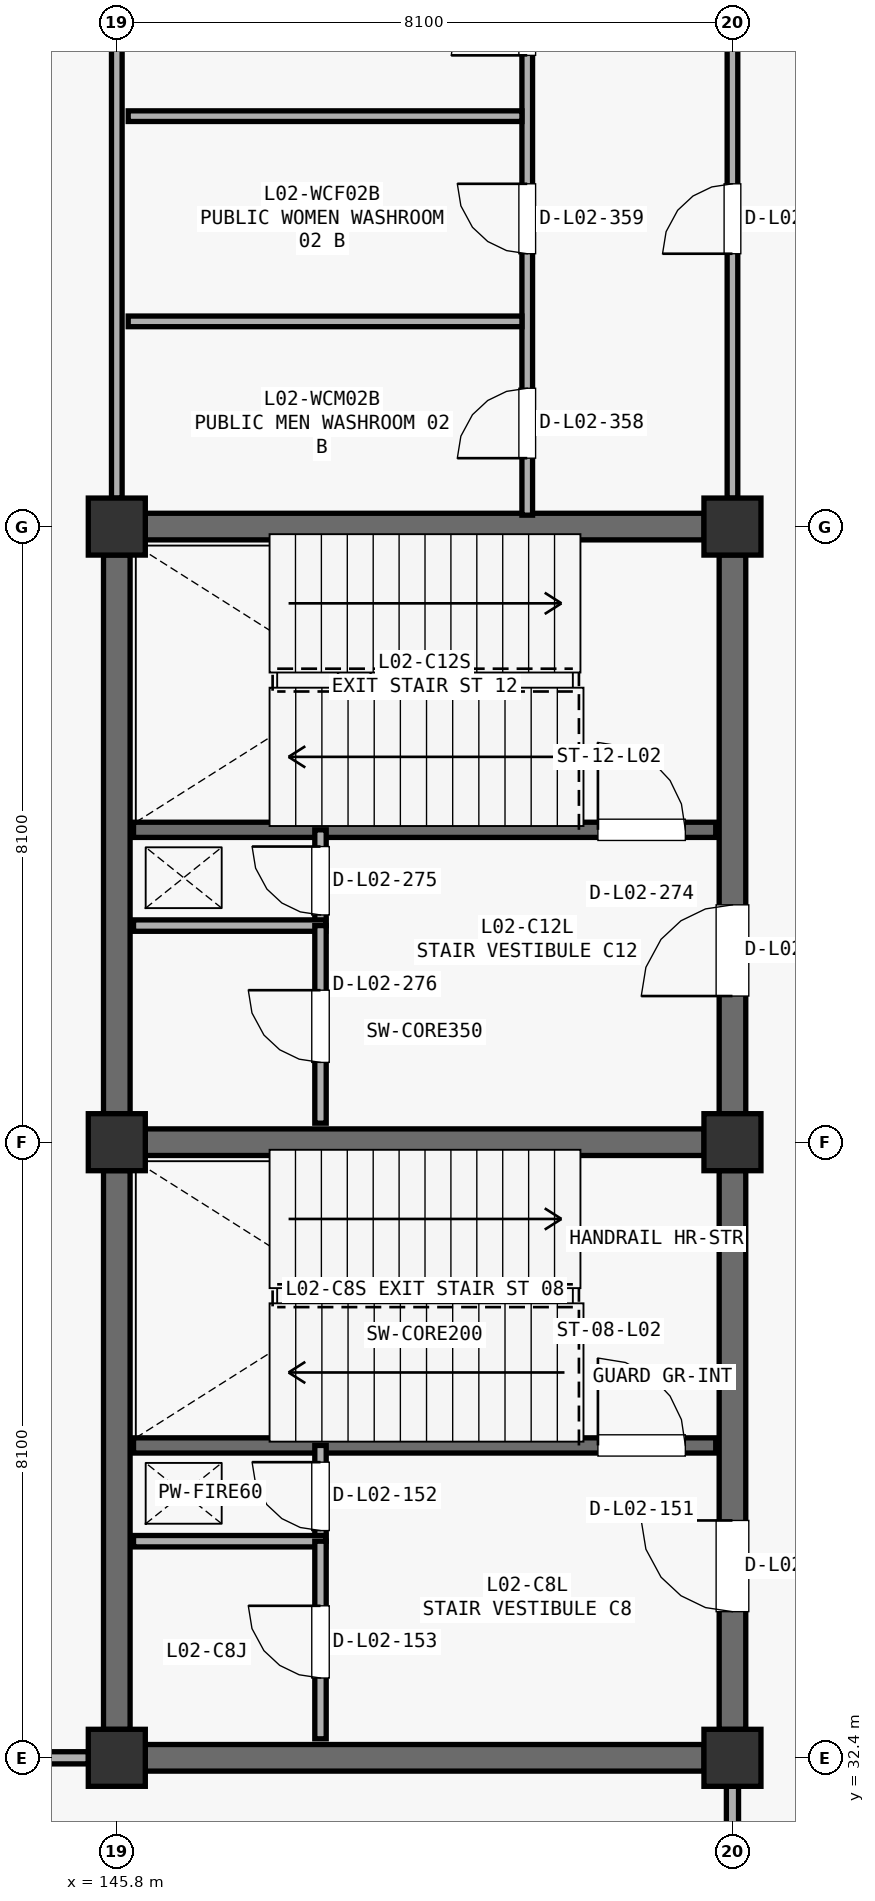
"""IFC4 building model, lengths in metres.
Left out: names, types, materials, properties, quantities, classifications, styles, units other than length and angle.
Written with IfcOpenShell. Run it as: python <this file> out.ifc"""

import sys

from ifc_helpers import new_model, si_unit, direction, frame, frame_2d, origin, origin_2d, place, context, subcontext, project, spatial, rectangle, extrude, element, fill, save


model = new_model("IFC4")
c1 = context("Model", 3, precision=1e-05, world=origin(), true_north=direction((0.0, 1.0)))
c2 = subcontext(c1, "Body", "Model", "MODEL_VIEW")
j1 = project(units=[si_unit("LENGTHUNIT", "METRE"), si_unit("PLANEANGLEUNIT", "RADIAN")], contexts=[c1])
p1 = place(None, origin())
s1 = spatial("IfcSite", under=j1, at=p1, CompositionType="ELEMENT")
p2 = place(p1, origin())
s2 = spatial("IfcBuilding", under=s1, at=p2, CompositionType="ELEMENT")
p3 = place(p2, frame((0.0, 0.0, 9.69)))
s3 = spatial("IfcBuildingStorey", under=s2, at=p3, CompositionType="ELEMENT", Elevation=9.69)
for number, where, z_axis, x_axis in (
    (1, (145.8, 32.4, 0.0), (0.0, 0.0, 1.0), (1.0, 0.0, 0.0)),
    (2, (145.8, 40.5, 0.0), (0.0, 0.0, 1.0), (1.0, 0.0, 0.0)),
    (3, (145.8, 48.6, 0.0), (0.0, 0.0, 1.0), (1.0, 0.0, 0.0)),
    (4, (153.9, 32.4, 0.0), (0.0, 0.0, 1.0), (1.0, 0.0, 0.0)),
    (5, (153.9, 40.5, 0.0), (0.0, 0.0, 1.0), (1.0, 0.0, 0.0)),
    (6, (153.9, 48.6, 0.0), (0.0, 0.0, 1.0), (1.0, 0.0, 0.0)),
):
    element("IfcColumn", number, at=place(p3, frame(where, z_axis=z_axis, x_axis=x_axis)), inside=s3, PredefinedType="COLUMN", context=c2, shape_type="SweptSolid", body=[
        extrude(rectangle(XDim=0.75, YDim=0.75, at=origin_2d()), origin(), (0.0, 0.0, 1.0), 4.42),
    ])
for number, where, z_axis, x_axis in (
    (7, (146.173, 40.5, 0.0), (0.0, 0.0, 1.0), (1.0, 0.0, 0.0)),
    (8, (145.8, 32.773, 0.0), (0.0, 0.0, 1.0), (0.0, 1.0, 0.0)),
):
    element("IfcWall", number, at=place(p3, frame(where, z_axis=z_axis, x_axis=x_axis)), inside=s3, PredefinedType="SHEAR", context=c2, shape_type="SweptSolid", body=[
        extrude(rectangle(XDim=7.354, YDim=0.35, at=frame_2d((3.677, 0.0))), origin(), (0.0, 0.0, 1.0), 4.142),
    ])
p4 = place(p3, frame((153.9, 32.773, 0.0), z_axis=(0.0, 0.0, 1.0), x_axis=(0.0, 1.0, 0.0)))
e9 = element("IfcWall", 9, at=p4, inside=s3, PredefinedType="SHEAR", context=c2, shape_type="SweptSolid", body=[
    extrude(rectangle(XDim=7.354, YDim=0.35, at=frame_2d((3.677, 0.0))), origin(), (0.0, 0.0, 1.0), 4.142),
])
p5 = place(p4, frame((1.55, 0.0, 0.0)))
e10 = element("IfcOpeningElement", 10, at=p5, cuts=e9, PredefinedType="OPENING", context=c2, shape_type="SweptSolid", body=[
    extrude(rectangle(XDim=1.2, YDim=2.2, at=frame_2d((0.6, 1.1))), frame((0.0, 0.185, 0.0), z_axis=(0.0, -1.0, 0.0), x_axis=(1.0, 0.0, 0.0)), (0.0, 0.0, 1.0), 0.37),
])
p6 = place(p3, frame((146.173, 32.4, 0.0), z_axis=(0.0, 0.0, 1.0), x_axis=(1.0, 0.0, 0.0)))
e11 = element("IfcWall", 11, at=p6, inside=s3, PredefinedType="SHEAR", context=c2, shape_type="SweptSolid", body=[
    extrude(rectangle(XDim=7.354, YDim=0.35, at=frame_2d((3.677, 0.0))), origin(), (0.0, 0.0, 1.0), 4.142),
])
p7 = place(p3, frame((146.02, 36.51, 0.0), z_axis=(0.0, 0.0, 1.0), x_axis=(1.0, 0.0, 0.0)))
e12 = element("IfcWall", 12, at=p7, inside=s3, PredefinedType="SHEAR", context=c2, shape_type="SweptSolid", body=[
    extrude(rectangle(XDim=7.66, YDim=0.2, at=frame_2d((3.83, 0.0))), origin(), (0.0, 0.0, 1.0), 4.142),
])
p8 = place(p7, frame((6.11, 0.0, 0.0)))
e13 = element("IfcOpeningElement", 13, at=p8, cuts=e12, PredefinedType="OPENING", context=c2, shape_type="SweptSolid", body=[
    extrude(rectangle(XDim=1.15, YDim=2.2, at=frame_2d((0.575, 1.1))), frame((0.0, 0.11, 0.0), z_axis=(0.0, -1.0, 0.0), x_axis=(1.0, 0.0, 0.0)), (0.0, 0.0, 1.0), 0.22),
])
p9 = place(p3, frame((148.48, 35.25, 0.0), z_axis=(0.0, 0.0, 1.0), x_axis=(0.0, 1.0, 0.0)))
e14 = element("IfcWall", 14, at=p9, inside=s3, PredefinedType="PARTITIONING", context=c2, shape_type="SweptSolid", body=[
    extrude(rectangle(XDim=1.26, YDim=0.15, at=frame_2d((0.63, 0.0))), origin(), (0.0, 0.0, 1.0), 4.142),
])
p10 = place(p9, frame((0.14, 0.0, 0.0)))
e15 = element("IfcOpeningElement", 15, at=p10, cuts=e14, PredefinedType="OPENING", context=c2, shape_type="SweptSolid", body=[
    extrude(rectangle(XDim=0.9, YDim=2.15, at=frame_2d((0.45, 1.075))), frame((0.0, 0.085, 0.0), z_axis=(0.0, -1.0, 0.0), x_axis=(1.0, 0.0, 0.0)), (0.0, 0.0, 1.0), 0.17),
])
p11 = place(p3, frame((146.02, 35.25, 0.0), z_axis=(0.0, 0.0, 1.0), x_axis=(1.0, 0.0, 0.0)))
e16 = element("IfcWall", 16, at=p11, inside=s3, PredefinedType="PARTITIONING", context=c2, shape_type="SweptSolid", body=[
    extrude(rectangle(XDim=2.53, YDim=0.15, at=frame_2d((1.265, 0.0))), origin(), (0.0, 0.0, 1.0), 4.142),
])
p12 = place(p3, frame((148.48, 32.65, 0.0), z_axis=(0.0, 0.0, 1.0), x_axis=(0.0, 1.0, 0.0)))
e17 = element("IfcWall", 17, at=p12, inside=s3, PredefinedType="PARTITIONING", context=c2, shape_type="SweptSolid", body=[
    extrude(rectangle(XDim=2.6, YDim=0.15, at=frame_2d((1.3, 0.0))), origin(), (0.0, 0.0, 1.0), 4.142),
])
p13 = place(p12, frame((0.8, 0.0, 0.0)))
e18 = element("IfcOpeningElement", 18, at=p13, cuts=e17, PredefinedType="OPENING", context=c2, shape_type="SweptSolid", body=[
    extrude(rectangle(XDim=0.95, YDim=2.15, at=frame_2d((0.475, 1.075))), frame((0.0, 0.085, 0.0), z_axis=(0.0, -1.0, 0.0), x_axis=(1.0, 0.0, 0.0)), (0.0, 0.0, 1.0), 0.17),
])
for number, where, z_axis, x_axis in (
    (19, (146.173, 48.6, 0.0), (0.0, 0.0, 1.0), (1.0, 0.0, 0.0)),
    (20, (145.8, 40.873, 0.0), (0.0, 0.0, 1.0), (0.0, 1.0, 0.0)),
):
    element("IfcWall", number, at=place(p3, frame(where, z_axis=z_axis, x_axis=x_axis)), inside=s3, PredefinedType="SHEAR", context=c2, shape_type="SweptSolid", body=[
        extrude(rectangle(XDim=7.354, YDim=0.35, at=frame_2d((3.677, 0.0))), origin(), (0.0, 0.0, 1.0), 4.142),
    ])
p14 = place(p3, frame((153.9, 40.873, 0.0), z_axis=(0.0, 0.0, 1.0), x_axis=(0.0, 1.0, 0.0)))
e21 = element("IfcWall", 21, at=p14, inside=s3, PredefinedType="SHEAR", context=c2, shape_type="SweptSolid", body=[
    extrude(rectangle(XDim=7.354, YDim=0.35, at=frame_2d((3.677, 0.0))), origin(), (0.0, 0.0, 1.0), 4.142),
])
p15 = place(p14, frame((1.55, 0.0, 0.0)))
e22 = element("IfcOpeningElement", 22, at=p15, cuts=e21, PredefinedType="OPENING", context=c2, shape_type="SweptSolid", body=[
    extrude(rectangle(XDim=1.2, YDim=2.2, at=frame_2d((0.6, 1.1))), frame((0.0, 0.185, 0.0), z_axis=(0.0, -1.0, 0.0), x_axis=(1.0, 0.0, 0.0)), (0.0, 0.0, 1.0), 0.37),
])
p16 = place(p3, frame((146.02, 44.61, 0.0), z_axis=(0.0, 0.0, 1.0), x_axis=(1.0, 0.0, 0.0)))
e23 = element("IfcWall", 23, at=p16, inside=s3, PredefinedType="SHEAR", context=c2, shape_type="SweptSolid", body=[
    extrude(rectangle(XDim=7.66, YDim=0.2, at=frame_2d((3.83, 0.0))), origin(), (0.0, 0.0, 1.0), 4.142),
])
p17 = place(p16, frame((6.11, 0.0, 0.0)))
e24 = element("IfcOpeningElement", 24, at=p17, cuts=e23, PredefinedType="OPENING", context=c2, shape_type="SweptSolid", body=[
    extrude(rectangle(XDim=1.15, YDim=2.2, at=frame_2d((0.575, 1.1))), frame((0.0, 0.11, 0.0), z_axis=(0.0, -1.0, 0.0), x_axis=(1.0, 0.0, 0.0)), (0.0, 0.0, 1.0), 0.22),
])
p18 = place(p3, frame((148.48, 43.35, 0.0), z_axis=(0.0, 0.0, 1.0), x_axis=(0.0, 1.0, 0.0)))
e25 = element("IfcWall", 25, at=p18, inside=s3, PredefinedType="PARTITIONING", context=c2, shape_type="SweptSolid", body=[
    extrude(rectangle(XDim=1.26, YDim=0.15, at=frame_2d((0.63, 0.0))), origin(), (0.0, 0.0, 1.0), 4.142),
])
p19 = place(p18, frame((0.14, 0.0, 0.0)))
e26 = element("IfcOpeningElement", 26, at=p19, cuts=e25, PredefinedType="OPENING", context=c2, shape_type="SweptSolid", body=[
    extrude(rectangle(XDim=0.9, YDim=2.15, at=frame_2d((0.45, 1.075))), frame((0.0, 0.085, 0.0), z_axis=(0.0, -1.0, 0.0), x_axis=(1.0, 0.0, 0.0)), (0.0, 0.0, 1.0), 0.17),
])
p20 = place(p3, frame((146.02, 43.35, 0.0), z_axis=(0.0, 0.0, 1.0), x_axis=(1.0, 0.0, 0.0)))
e27 = element("IfcWall", 27, at=p20, inside=s3, PredefinedType="PARTITIONING", context=c2, shape_type="SweptSolid", body=[
    extrude(rectangle(XDim=2.53, YDim=0.15, at=frame_2d((1.265, 0.0))), origin(), (0.0, 0.0, 1.0), 4.142),
])
p21 = place(p3, frame((148.48, 40.75, 0.0), z_axis=(0.0, 0.0, 1.0), x_axis=(0.0, 1.0, 0.0)))
e28 = element("IfcWall", 28, at=p21, inside=s3, PredefinedType="PARTITIONING", context=c2, shape_type="SweptSolid", body=[
    extrude(rectangle(XDim=2.6, YDim=0.15, at=frame_2d((1.3, 0.0))), origin(), (0.0, 0.0, 1.0), 4.142),
])
p22 = place(p21, frame((0.8, 0.0, 0.0)))
e29 = element("IfcOpeningElement", 29, at=p22, cuts=e28, PredefinedType="OPENING", context=c2, shape_type="SweptSolid", body=[
    extrude(rectangle(XDim=0.95, YDim=2.15, at=frame_2d((0.475, 1.075))), frame((0.0, 0.085, 0.0), z_axis=(0.0, -1.0, 0.0), x_axis=(1.0, 0.0, 0.0)), (0.0, 0.0, 1.0), 0.17),
])
p23 = place(p3, frame((145.8, 48.973, 0.0), z_axis=(0.0, 0.0, 1.0), x_axis=(0.0, 1.0, 0.0)))
e30 = element("IfcWall", 30, at=p23, inside=s3, PredefinedType="PARTITIONING", context=c2, shape_type="SweptSolid", body=[
    extrude(rectangle(XDim=7.354, YDim=0.14, at=frame_2d((3.677, 0.0))), origin(), (0.0, 0.0, 1.0), 3.39),
])
p24 = place(p3, frame((153.9, 48.973, 0.0), z_axis=(0.0, 0.0, 1.0), x_axis=(0.0, 1.0, 0.0)))
e31 = element("IfcWall", 31, at=p24, inside=s3, PredefinedType="PARTITIONING", context=c2, shape_type="SweptSolid", body=[
    extrude(rectangle(XDim=7.354, YDim=0.14, at=frame_2d((3.677, 0.0))), origin(), (0.0, 0.0, 1.0), 3.54),
])
p25 = place(p24, frame((3.217, 0.0, 0.0)))
e32 = element("IfcOpeningElement", 32, at=p25, cuts=e31, PredefinedType="OPENING", context=c2, shape_type="SweptSolid", body=[
    extrude(rectangle(XDim=0.92, YDim=2.15, at=frame_2d((0.46, 1.075))), frame((0.0, 0.08, 0.0), z_axis=(0.0, -1.0, 0.0), x_axis=(1.0, 0.0, 0.0)), (0.0, 0.0, 1.0), 0.16),
])
p26 = place(p3, frame((151.2, 48.75, 0.0), z_axis=(0.0, 0.0, 1.0), x_axis=(0.0, 1.0, 0.0)))
e33 = element("IfcWall", 33, at=p26, inside=s3, PredefinedType="PARTITIONING", context=c2, shape_type="SweptSolid", body=[
    extrude(rectangle(XDim=7.8, YDim=0.14, at=frame_2d((3.9, 0.0))), origin(), (0.0, 0.0, 1.0), 4.142),
])
p27 = place(p26, frame((0.75, 0.0, 0.0)))
e34 = element("IfcOpeningElement", 34, at=p27, cuts=e33, PredefinedType="OPENING", context=c2, shape_type="SweptSolid", body=[
    extrude(rectangle(XDim=0.92, YDim=2.15, at=frame_2d((0.46, 1.075))), frame((0.0, 0.08, 0.0), z_axis=(0.0, -1.0, 0.0), x_axis=(1.0, 0.0, 0.0)), (0.0, 0.0, 1.0), 0.16),
])
p28 = place(p26, frame((3.44, 0.0, 0.0)))
e35 = element("IfcOpeningElement", 35, at=p28, cuts=e33, PredefinedType="OPENING", context=c2, shape_type="SweptSolid", body=[
    extrude(rectangle(XDim=0.92, YDim=2.15, at=frame_2d((0.46, 1.075))), frame((0.0, 0.08, 0.0), z_axis=(0.0, -1.0, 0.0), x_axis=(1.0, 0.0, 0.0)), (0.0, 0.0, 1.0), 0.16),
])
p29 = place(p26, frame((6.05, 0.0, 0.0)))
e36 = element("IfcOpeningElement", 36, at=p29, cuts=e33, PredefinedType="OPENING", context=c2, shape_type="SweptSolid", body=[
    extrude(rectangle(XDim=1.0, YDim=2.15, at=frame_2d((0.5, 1.075))), frame((0.0, 0.08, 0.0), z_axis=(0.0, -1.0, 0.0), x_axis=(1.0, 0.0, 0.0)), (0.0, 0.0, 1.0), 0.16),
])
for number, where, z_axis, x_axis in (
    (37, (145.95, 51.3, 0.0), (0.0, 0.0, 1.0), (1.0, 0.0, 0.0)),
    (38, (145.95, 54.0, 0.0), (0.0, 0.0, 1.0), (1.0, 0.0, 0.0)),
):
    element("IfcWall", number, at=place(p3, frame(where, z_axis=z_axis, x_axis=x_axis)), inside=s3, PredefinedType="PARTITIONING", context=c2, shape_type="SweptSolid", body=[
        extrude(rectangle(XDim=5.18, YDim=0.14, at=frame_2d((2.59, 0.0))), origin(), (0.0, 0.0, 1.0), 4.142),
    ])
for number, where, z_axis, x_axis in (
    (39, (153.9, 24.673, 0.0), (0.0, 0.0, 1.0), (0.0, 1.0, 0.0)),
    (40, (138.073, 32.4, 0.0), (0.0, 0.0, 1.0), (1.0, 0.0, 0.0)),
):
    element("IfcWall", number, at=place(p3, frame(where, z_axis=z_axis, x_axis=x_axis)), inside=s3, PredefinedType="PARTITIONING", context=c2, shape_type="SweptSolid", body=[
        extrude(rectangle(XDim=7.354, YDim=0.16, at=frame_2d((3.677, 0.0))), origin(), (0.0, 0.0, 1.0), 3.192),
    ])
p30 = place(p5, origin())
e41 = element("IfcDoor", 41, at=p30, inside=s3, OperationType="SINGLE_SWING_RIGHT", PredefinedType="DOOR", context=c2, shape_type="SweptSolid", body=[
    extrude(rectangle(XDim=1.2, YDim=2.2, at=frame_2d((0.6, 1.1))), frame((0.0, 0.025, 0.0), z_axis=(0.0, -1.0, 0.0), x_axis=(1.0, 0.0, 0.0)), (0.0, 0.0, 1.0), 0.05),
])
fill(e10, e41)
p31 = place(p8, origin())
e42 = element("IfcDoor", 42, at=p31, inside=s3, OperationType="SINGLE_SWING_LEFT", PredefinedType="DOOR", context=c2, shape_type="SweptSolid", body=[
    extrude(rectangle(XDim=1.15, YDim=2.2, at=frame_2d((0.575, 1.1))), frame((0.0, 0.025, 0.0), z_axis=(0.0, -1.0, 0.0), x_axis=(1.0, 0.0, 0.0)), (0.0, 0.0, 1.0), 0.05),
])
fill(e13, e42)
p32 = place(p10, origin())
e43 = element("IfcDoor", 43, at=p32, inside=s3, OperationType="SINGLE_SWING_RIGHT", PredefinedType="DOOR", context=c2, shape_type="SweptSolid", body=[
    extrude(rectangle(XDim=0.9, YDim=2.15, at=frame_2d((0.45, 1.075))), frame((0.0, 0.025, 0.0), z_axis=(0.0, -1.0, 0.0), x_axis=(1.0, 0.0, 0.0)), (0.0, 0.0, 1.0), 0.05),
])
fill(e15, e43)
p33 = place(p13, origin())
e44 = element("IfcDoor", 44, at=p33, inside=s3, OperationType="SINGLE_SWING_RIGHT", PredefinedType="DOOR", context=c2, shape_type="SweptSolid", body=[
    extrude(rectangle(XDim=0.95, YDim=2.15, at=frame_2d((0.475, 1.075))), frame((0.0, 0.025, 0.0), z_axis=(0.0, -1.0, 0.0), x_axis=(1.0, 0.0, 0.0)), (0.0, 0.0, 1.0), 0.05),
])
fill(e18, e44)
p34 = place(p15, origin())
e45 = element("IfcDoor", 45, at=p34, inside=s3, OperationType="SINGLE_SWING_LEFT", PredefinedType="DOOR", context=c2, shape_type="SweptSolid", body=[
    extrude(rectangle(XDim=1.2, YDim=2.2, at=frame_2d((0.6, 1.1))), frame((0.0, 0.025, 0.0), z_axis=(0.0, -1.0, 0.0), x_axis=(1.0, 0.0, 0.0)), (0.0, 0.0, 1.0), 0.05),
])
fill(e22, e45)
p35 = place(p17, origin())
e46 = element("IfcDoor", 46, at=p35, inside=s3, OperationType="SINGLE_SWING_LEFT", PredefinedType="DOOR", context=c2, shape_type="SweptSolid", body=[
    extrude(rectangle(XDim=1.15, YDim=2.2, at=frame_2d((0.575, 1.1))), frame((0.0, 0.025, 0.0), z_axis=(0.0, -1.0, 0.0), x_axis=(1.0, 0.0, 0.0)), (0.0, 0.0, 1.0), 0.05),
])
fill(e24, e46)
p36 = place(p19, origin())
e47 = element("IfcDoor", 47, at=p36, inside=s3, OperationType="SINGLE_SWING_RIGHT", PredefinedType="DOOR", context=c2, shape_type="SweptSolid", body=[
    extrude(rectangle(XDim=0.9, YDim=2.15, at=frame_2d((0.45, 1.075))), frame((0.0, 0.025, 0.0), z_axis=(0.0, -1.0, 0.0), x_axis=(1.0, 0.0, 0.0)), (0.0, 0.0, 1.0), 0.05),
])
fill(e26, e47)
p37 = place(p22, origin())
e48 = element("IfcDoor", 48, at=p37, inside=s3, OperationType="SINGLE_SWING_RIGHT", PredefinedType="DOOR", context=c2, shape_type="SweptSolid", body=[
    extrude(rectangle(XDim=0.95, YDim=2.15, at=frame_2d((0.475, 1.075))), frame((0.0, 0.025, 0.0), z_axis=(0.0, -1.0, 0.0), x_axis=(1.0, 0.0, 0.0)), (0.0, 0.0, 1.0), 0.05),
])
fill(e29, e48)
p38 = place(p25, origin())
e49 = element("IfcDoor", 49, at=p38, inside=s3, OperationType="SINGLE_SWING_LEFT", PredefinedType="DOOR", context=c2, shape_type="SweptSolid", body=[
    extrude(rectangle(XDim=0.92, YDim=2.15, at=frame_2d((0.46, 1.075))), frame((0.0, 0.025, 0.0), z_axis=(0.0, -1.0, 0.0), x_axis=(1.0, 0.0, 0.0)), (0.0, 0.0, 1.0), 0.05),
])
fill(e32, e49)
p39 = place(p27, origin())
e50 = element("IfcDoor", 50, at=p39, inside=s3, OperationType="SINGLE_SWING_LEFT", PredefinedType="DOOR", context=c2, shape_type="SweptSolid", body=[
    extrude(rectangle(XDim=0.92, YDim=2.15, at=frame_2d((0.46, 1.075))), frame((0.0, 0.025, 0.0), z_axis=(0.0, -1.0, 0.0), x_axis=(1.0, 0.0, 0.0)), (0.0, 0.0, 1.0), 0.05),
])
fill(e34, e50)
p40 = place(p28, origin())
e51 = element("IfcDoor", 51, at=p40, inside=s3, OperationType="SINGLE_SWING_RIGHT", PredefinedType="DOOR", context=c2, shape_type="SweptSolid", body=[
    extrude(rectangle(XDim=0.92, YDim=2.15, at=frame_2d((0.46, 1.075))), frame((0.0, 0.025, 0.0), z_axis=(0.0, -1.0, 0.0), x_axis=(1.0, 0.0, 0.0)), (0.0, 0.0, 1.0), 0.05),
])
fill(e35, e51)
p41 = place(p29, origin())
e52 = element("IfcDoor", 52, at=p41, inside=s3, OperationType="SINGLE_SWING_LEFT", PredefinedType="DOOR", context=c2, shape_type="SweptSolid", body=[
    extrude(rectangle(XDim=1.0, YDim=2.15, at=frame_2d((0.5, 1.075))), frame((0.0, 0.025, 0.0), z_axis=(0.0, -1.0, 0.0), x_axis=(1.0, 0.0, 0.0)), (0.0, 0.0, 1.0), 0.05),
])
fill(e36, e52)
save(model, sys.argv[1])
